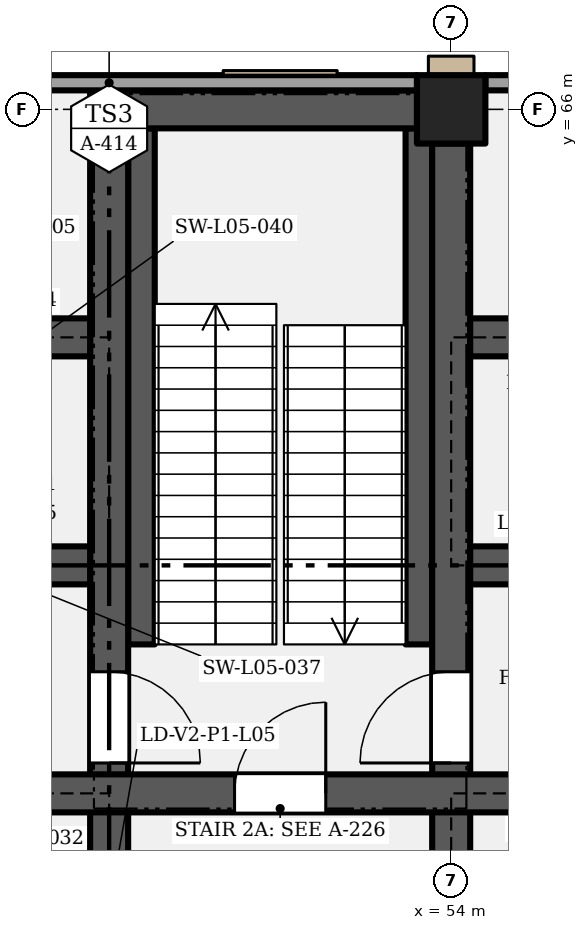
"""IFC4 building model, lengths in metres.
Left out: names, types, materials, properties, quantities, classifications, styles, units other than length and angle.
Written with IfcOpenShell. Run it as: python <this file> out.ifc"""

import sys

from ifc_helpers import new_model, si_unit, direction, frame, frame_2d, origin, origin_2d, place, context, subcontext, project, spatial, rectangle, extrude, element, fill, save


model = new_model("IFC4")
c1 = context("Model", 3, precision=1e-05, world=origin(), true_north=direction((0.0, 1.0)))
c2 = subcontext(c1, "Body", "Model", "MODEL_VIEW")
j1 = project(units=[si_unit("LENGTHUNIT", "METRE"), si_unit("PLANEANGLEUNIT", "RADIAN")], contexts=[c1])
p1 = place(None, origin())
s1 = spatial("IfcSite", under=j1, at=p1, CompositionType="ELEMENT")
p2 = place(p1, origin())
s2 = spatial("IfcBuilding", under=s1, at=p2, CompositionType="ELEMENT")
p3 = place(p2, frame((0.0, 0.0, 28.2)))
s3 = spatial("IfcBuildingStorey", under=s2, at=p3, CompositionType="ELEMENT", Elevation=28.2)
p4 = place(p3, frame((54.0, 66.0, 0.0), z_axis=(0.0, 0.0, 1.0), x_axis=(1.0, 0.0, 0.0)))
e1 = element("IfcColumn", 1, at=p4, inside=s3, PredefinedType="COLUMN", context=c2, shape_type="SweptSolid", body=[
    extrude(rectangle(XDim=0.9, YDim=0.9, at=origin_2d()), origin(), (0.0, 0.0, 1.0), 5.4),
])
p5 = place(p3, frame((49.5, 54.25, 0.0), z_axis=(0.0, 0.0, 1.0), x_axis=(0.0, 1.0, 0.0)))
e2 = element("IfcWall", 2, at=p5, inside=s3, PredefinedType="SHEAR", context=c2, shape_type="SweptSolid", body=[
    extrude(rectangle(XDim=11.5, YDim=0.5, at=frame_2d((5.75, 0.0))), origin(), (0.0, 0.0, 1.0), 5.15),
])
p6 = place(p5, frame((0.7, 0.0, 0.0)))
e3 = element("IfcOpeningElement", 3, at=p6, cuts=e2, PredefinedType="OPENING", context=c2, shape_type="SweptSolid", body=[
    extrude(rectangle(XDim=1.1, YDim=2.1, at=frame_2d((0.55, 1.05))), frame((0.0, 0.26, 0.0), z_axis=(0.0, -1.0, 0.0), x_axis=(1.0, 0.0, 0.0)), (0.0, 0.0, 1.0), 0.52),
])
p7 = place(p5, frame((4.35, 0.0, 0.0), z_axis=(0.0, 0.0, 1.0), x_axis=(-1.0, 0.0, 0.0)))
e4 = element("IfcOpeningElement", 4, at=p7, cuts=e2, PredefinedType="OPENING", context=c2, shape_type="SweptSolid", body=[
    extrude(rectangle(XDim=1.2, YDim=2.1, at=frame_2d((0.6, 1.05))), frame((0.0, 0.26, 0.0), z_axis=(0.0, -1.0, 0.0), x_axis=(1.0, 0.0, 0.0)), (0.0, 0.0, 1.0), 0.52),
])
p8 = place(p3, frame((54.0, 54.45, 0.0), z_axis=(0.0, 0.0, 1.0), x_axis=(0.0, 1.0, 0.0)))
e5 = element("IfcWall", 5, at=p8, inside=s3, PredefinedType="SHEAR", context=c2, shape_type="SweptSolid", body=[
    extrude(rectangle(XDim=11.1, YDim=0.5, at=frame_2d((5.55, 0.0))), origin(), (0.0, 0.0, 1.0), 5.15),
])
p9 = place(p8, frame((0.5, 0.0, 0.0)))
e6 = element("IfcOpeningElement", 6, at=p9, cuts=e5, PredefinedType="OPENING", context=c2, shape_type="SweptSolid", body=[
    extrude(rectangle(XDim=1.1, YDim=2.1, at=frame_2d((0.55, 1.05))), frame((0.0, 0.26, 0.0), z_axis=(0.0, -1.0, 0.0), x_axis=(1.0, 0.0, 0.0)), (0.0, 0.0, 1.0), 0.52),
])
p10 = place(p8, frame((2.95, 0.0, 0.0)))
e7 = element("IfcOpeningElement", 7, at=p10, cuts=e5, PredefinedType="OPENING", context=c2, shape_type="SweptSolid", body=[
    extrude(rectangle(XDim=1.2, YDim=2.1, at=frame_2d((0.6, 1.05))), frame((0.0, 0.26, 0.0), z_axis=(0.0, -1.0, 0.0), x_axis=(1.0, 0.0, 0.0)), (0.0, 0.0, 1.0), 0.52),
])
p11 = place(p3, frame((46.25, 57.0, 0.0), z_axis=(0.0, 0.0, 1.0), x_axis=(1.0, 0.0, 0.0)))
e8 = element("IfcWall", 8, at=p11, inside=s3, PredefinedType="SHEAR", context=c2, shape_type="SweptSolid", body=[
    extrude(rectangle(XDim=11.0, YDim=0.5, at=frame_2d((5.5, 0.0))), origin(), (0.0, 0.0, 1.0), 5.15),
])
p12 = place(p11, frame((4.9, 0.0, 0.0)))
e9 = element("IfcOpeningElement", 9, at=p12, cuts=e8, PredefinedType="OPENING", context=c2, shape_type="SweptSolid", body=[
    extrude(rectangle(XDim=1.2, YDim=2.1, at=frame_2d((0.6, 1.05))), frame((0.0, 0.26, 0.0), z_axis=(0.0, -1.0, 0.0), x_axis=(1.0, 0.0, 0.0)), (0.0, 0.0, 1.0), 0.52),
])
p13 = place(p3, frame((46.25, 60.0, 0.0), z_axis=(0.0, 0.0, 1.0), x_axis=(1.0, 0.0, 0.0)))
e10 = element("IfcWall", 10, at=p13, inside=s3, PredefinedType="SHEAR", context=c2, shape_type="SweptSolid", body=[
    extrude(rectangle(XDim=3.0, YDim=0.5, at=frame_2d((1.5, 0.0))), origin(), (0.0, 0.0, 1.0), 5.15),
])
p14 = place(p3, frame((54.25, 60.0, 0.0), z_axis=(0.0, 0.0, 1.0), x_axis=(1.0, 0.0, 0.0)))
e11 = element("IfcWall", 11, at=p14, inside=s3, PredefinedType="SHEAR", context=c2, shape_type="SweptSolid", body=[
    extrude(rectangle(XDim=3.0, YDim=0.5, at=frame_2d((1.5, 0.0))), origin(), (0.0, 0.0, 1.0), 5.15),
])
p15 = place(p14, frame((0.7, 0.0, 0.0)))
e12 = element("IfcOpeningElement", 12, at=p15, cuts=e11, PredefinedType="OPENING", context=c2, shape_type="SweptSolid", body=[
    extrude(rectangle(XDim=1.1, YDim=2.1, at=frame_2d((0.55, 1.05))), frame((0.0, 0.26, 0.0), z_axis=(0.0, -1.0, 0.0), x_axis=(1.0, 0.0, 0.0)), (0.0, 0.0, 1.0), 0.52),
])
for number, where, z_axis, x_axis in (
    (13, (46.25, 63.0, 0.0), (0.0, 0.0, 1.0), (1.0, 0.0, 0.0)),
    (14, (54.25, 63.0, 0.0), (0.0, 0.0, 1.0), (1.0, 0.0, 0.0)),
):
    element("IfcWall", number, at=place(p3, frame(where, z_axis=z_axis, x_axis=x_axis)), inside=s3, PredefinedType="SHEAR", context=c2, shape_type="SweptSolid", body=[
        extrude(rectangle(XDim=3.0, YDim=0.5, at=frame_2d((1.5, 0.0))), origin(), (0.0, 0.0, 1.0), 5.15),
    ])
p16 = place(p3, frame((49.25, 66.0, 0.0), z_axis=(0.0, 0.0, 1.0), x_axis=(1.0, 0.0, 0.0)))
e15 = element("IfcWall", 15, at=p16, inside=s3, PredefinedType="SHEAR", context=c2, shape_type="SweptSolid", body=[
    extrude(rectangle(XDim=4.3, YDim=0.5, at=frame_2d((2.15, 0.0))), origin(), (0.0, 0.0, 1.0), 5.15),
])
p17 = place(p3, frame((45.45, 66.35, 0.0), z_axis=(0.0, 0.0, 1.0), x_axis=(1.0, 0.0, 0.0)))
e16 = element("IfcWall", 16, at=p17, inside=s3, PredefinedType="SOLIDWALL", context=c2, shape_type="SweptSolid", body=[
    extrude(rectangle(XDim=8.1, YDim=0.2, at=frame_2d((4.05, 0.0))), origin(), (0.0, 0.0, 1.0), 5.15),
])
p18 = place(p17, frame((1.05, 0.0, 1.05)))
e17 = element("IfcOpeningElement", 17, at=p18, cuts=e16, PredefinedType="OPENING", context=c2, shape_type="SweptSolid", body=[
    extrude(rectangle(XDim=1.5, YDim=3.5, at=frame_2d((0.75, 1.75))), frame((0.0, 0.11, 0.0), z_axis=(0.0, -1.0, 0.0), x_axis=(1.0, 0.0, 0.0)), (0.0, 0.0, 1.0), 0.22),
])
p19 = place(p3, frame((54.45, 66.35, 0.0), z_axis=(0.0, 0.0, 1.0), x_axis=(1.0, 0.0, 0.0)))
e18 = element("IfcWall", 18, at=p19, inside=s3, PredefinedType="SOLIDWALL", context=c2, shape_type="SweptSolid", body=[
    extrude(rectangle(XDim=8.1, YDim=0.2, at=frame_2d((4.05, 0.0))), origin(), (0.0, 0.0, 1.0), 5.15),
])
p20 = place(p3, frame((49.925, 58.96, 0.0), z_axis=(0.0, 0.0, 1.0), x_axis=(0.0, 1.0, 0.0)))
e19 = element("IfcWall", 19, at=p20, inside=s3, PredefinedType="SHEAR", context=c2, shape_type="SweptSolid", body=[
    extrude(rectangle(XDim=6.79, YDim=0.35, at=frame_2d((3.395, 0.0))), origin(), (0.0, 0.0, 1.0), 2.587),
])
p21 = place(p3, frame((53.575, 58.96, 0.0), z_axis=(0.0, 0.0, 1.0), x_axis=(0.0, 1.0, 0.0)))
e20 = element("IfcWall", 20, at=p21, inside=s3, PredefinedType="SHEAR", context=c2, shape_type="SweptSolid", body=[
    extrude(rectangle(XDim=6.79, YDim=0.35, at=frame_2d((3.395, 0.0))), origin(), (0.0, 0.0, 1.0), 5.15),
])
p22 = place(p12, origin())
e21 = element("IfcDoor", 21, at=p22, inside=s3, OperationType="SINGLE_SWING_RIGHT", PredefinedType="DOOR", context=c2, shape_type="SweptSolid", body=[
    extrude(rectangle(XDim=1.2, YDim=2.1, at=frame_2d((0.6, 1.05))), frame((0.0, 0.025, 0.0), z_axis=(0.0, -1.0, 0.0), x_axis=(1.0, 0.0, 0.0)), (0.0, 0.0, 1.0), 0.05),
])
fill(e9, e21)
p23 = place(p10, origin())
e22 = element("IfcDoor", 22, at=p23, inside=s3, OperationType="SINGLE_SWING_LEFT", PredefinedType="DOOR", context=c2, shape_type="SweptSolid", body=[
    extrude(rectangle(XDim=1.2, YDim=2.1, at=frame_2d((0.6, 1.05))), frame((0.0, 0.025, 0.0), z_axis=(0.0, -1.0, 0.0), x_axis=(1.0, 0.0, 0.0)), (0.0, 0.0, 1.0), 0.05),
])
fill(e7, e22)
p24 = place(p7, origin())
e23 = element("IfcDoor", 23, at=p24, inside=s3, OperationType="SINGLE_SWING_RIGHT", PredefinedType="DOOR", context=c2, shape_type="SweptSolid", body=[
    extrude(rectangle(XDim=1.2, YDim=2.1, at=frame_2d((0.6, 1.05))), frame((0.0, 0.025, 0.0), z_axis=(0.0, -1.0, 0.0), x_axis=(1.0, 0.0, 0.0)), (0.0, 0.0, 1.0), 0.05),
])
fill(e4, e23)
save(model, sys.argv[1])
